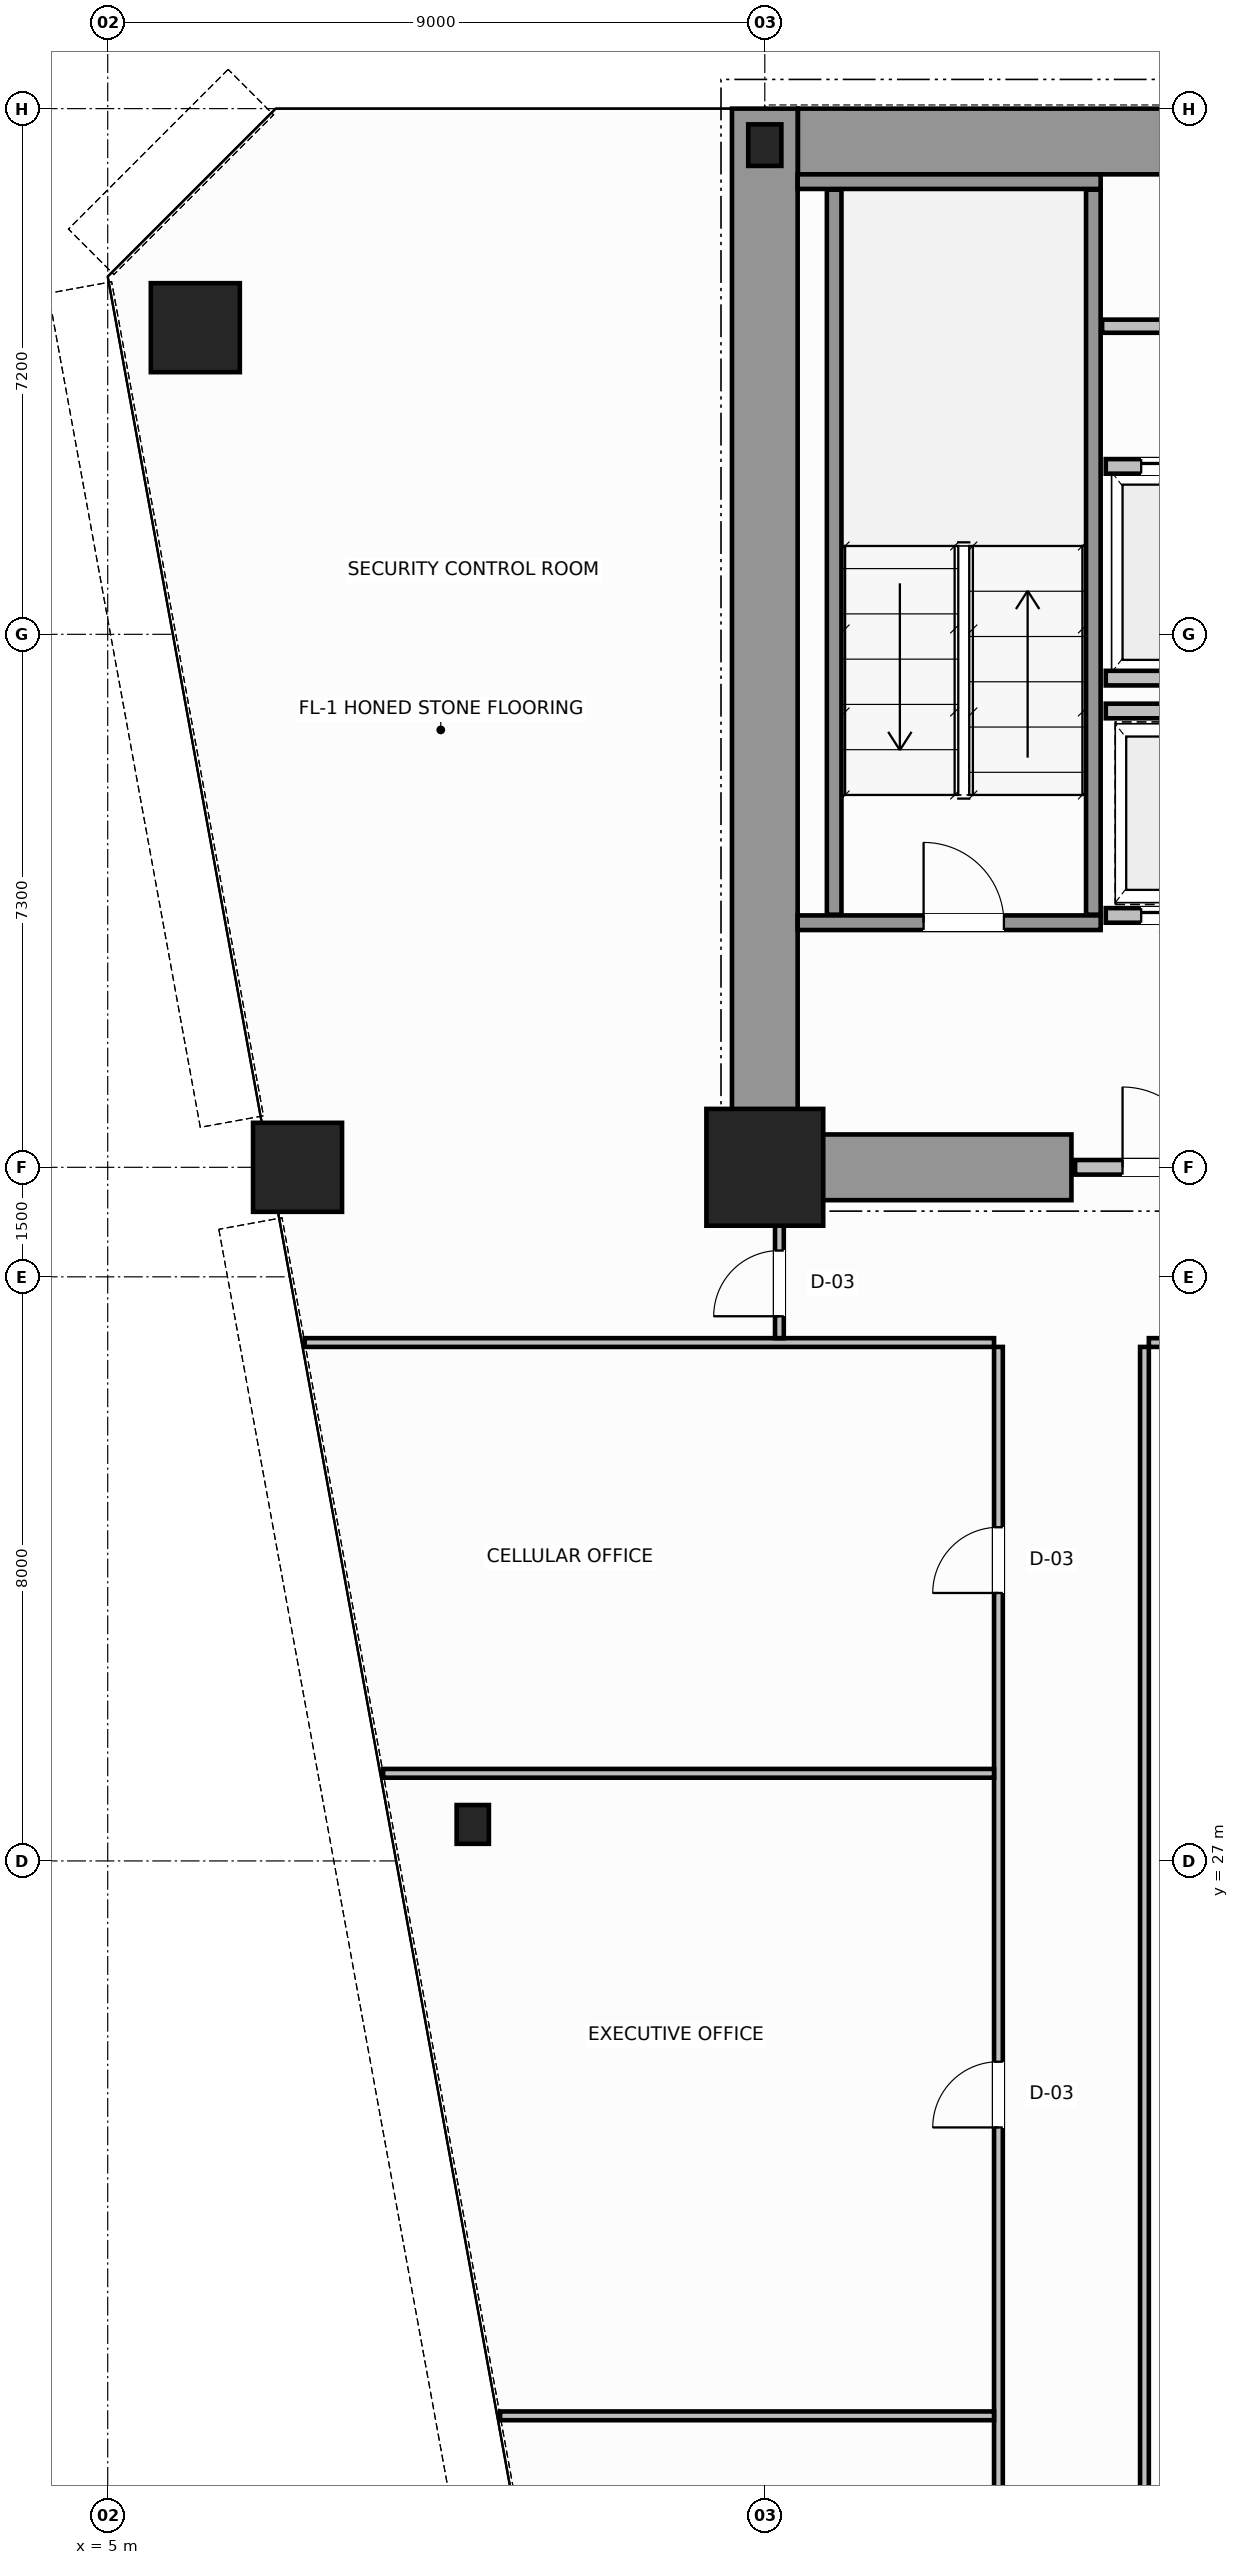
"""IFC4 building model, lengths in metres.
Left out: names, types, materials, properties, quantities, classifications, styles, units other than length and angle.
Written with IfcOpenShell. Run it as: python <this file> out.ifc"""

import sys

from ifc_helpers import new_model, si_unit, direction, frame, frame_2d, origin, origin_2d, place, context, subcontext, project, spatial, rectangle, hollow_circle, i_section, extrude, source, transform, mapped, element, fill, save


model = new_model("IFC4")
c1 = context("Model", 3, precision=1e-05, world=origin(), true_north=direction((0.0, 1.0)))
c2 = subcontext(c1, "Body", "Model", "MODEL_VIEW")
j1 = project(units=[si_unit("LENGTHUNIT", "METRE"), si_unit("PLANEANGLEUNIT", "RADIAN")], contexts=[c1])
p1 = place(None, origin())
s1 = spatial("IfcSite", under=j1, at=p1, CompositionType="ELEMENT")
p2 = place(p1, origin())
s2 = spatial("IfcBuilding", under=s1, at=p2, CompositionType="ELEMENT")
p3 = place(p2, frame((0.0, 0.0, 49.2)))
s3 = spatial("IfcBuildingStorey", under=s2, at=p3, CompositionType="ELEMENT", Elevation=49.2)
m1 = source(origin(), c2, "Body", "SweptSolid", [
    extrude(rectangle(XDim=1.6, YDim=1.6, at=origin_2d()), origin(), (0.0, 0.0, 1.0), 3.8),
])
p4 = place(p3, frame((14.0, 36.5, 0.0), z_axis=(0.0, 0.0, 1.0), x_axis=(1.0, 0.0, 0.0)))
e1 = element("IfcColumn", 1, at=p4, inside=s3, PredefinedType="COLUMN", context=c2, shape_type="MappedRepresentation", body=[
    mapped(m1, transform((0.0, 0.0, 0.0), scale=1.0)),
])
m2 = source(origin(), c2, "Body", "SweptSolid", [
    extrude(i_section(OverallWidth=0.454, OverallDepth=0.569, WebThickness=0.078, FlangeThickness=0.08, FilletRadius=0.015, at=origin_2d()), origin(), (0.0, 0.0, 1.0), 3.8),
])
p5 = place(p3, frame((14.0, 50.5, 0.0), z_axis=(0.0, 0.0, 1.0), x_axis=(1.0, 0.0, 0.0)))
e2 = element("IfcColumn", 2, at=p5, inside=s3, PredefinedType="COLUMN", context=c2, shape_type="MappedRepresentation", body=[
    mapped(m2, transform((0.0, 0.0, 0.0), scale=1.0)),
])
m3 = source(origin(), c2, "Body", "SweptSolid", [
    extrude(hollow_circle(Radius=0.61, WallThickness=0.05, at=origin_2d()), origin(), (0.0, 0.0, 1.0), 3.8),
])
for number, where, z_axis, x_axis in (
    (3, (6.2, 48.0, 0.0), (0.0, 0.0, 1.0), (1.0, 0.0, 0.0)),
    (4, (7.6, 36.5, 0.0), (0.0, 0.0, 1.0), (1.0, 0.0, 0.0)),
):
    element("IfcColumn", number, at=place(p3, frame(where, z_axis=z_axis, x_axis=x_axis)), inside=s3, PredefinedType="COLUMN", context=c2, shape_type="MappedRepresentation", body=[
        mapped(m3, transform((0.0, 0.0, 0.0), scale=1.0)),
    ])
m4 = source(origin(), c2, "Body", "SweptSolid", [
    extrude(i_section(OverallWidth=0.442, OverallDepth=0.531, WebThickness=0.065, FlangeThickness=0.076, FilletRadius=0.015, at=origin_2d()), origin(), (0.0, 0.0, 1.0), 3.8),
])
p6 = place(p3, frame((10.0, 27.5, 0.0), z_axis=(0.0, 0.0, 1.0), x_axis=(1.0, 0.0, 0.0)))
e5 = element("IfcColumn", 5, at=p6, inside=s3, PredefinedType="COLUMN", context=c2, shape_type="MappedRepresentation", body=[
    mapped(m4, transform((0.0, 0.0, 0.0), scale=1.0)),
])
p7 = place(p3, frame((14.454, 50.55, 0.0), z_axis=(0.0, 0.0, 1.0), x_axis=(1.0, 0.0, 0.0)))
e6 = element("IfcWall", 6, at=p7, inside=s3, PredefinedType="SHEAR", context=c2, shape_type="SweptSolid", body=[
    extrude(rectangle(XDim=19.544, YDim=0.9, at=frame_2d((9.772, 0.0))), origin(), (0.0, 0.0, 1.0), 3.8),
])
p8 = place(p3, frame((14.0, 36.5, 0.0), z_axis=(0.0, 0.0, 1.0), x_axis=(0.0, 1.0, 0.0)))
e7 = element("IfcWall", 7, at=p8, inside=s3, PredefinedType="SHEAR", context=c2, shape_type="SweptSolid", body=[
    extrude(rectangle(XDim=14.5, YDim=0.9, at=frame_2d((7.25, 0.0))), origin(), (0.0, 0.0, 1.0), 3.8),
])
p9 = place(p3, frame((14.47, 36.5, 0.0), z_axis=(0.0, 0.0, 1.0), x_axis=(1.0, 0.0, 0.0)))
e8 = element("IfcWall", 8, at=p9, inside=s3, PredefinedType="SHEAR", context=c2, shape_type="SweptSolid", body=[
    extrude(rectangle(XDim=3.73, YDim=0.9, at=frame_2d((1.865, 0.0))), origin(), (0.0, 0.0, 1.0), 2.38),
])
p10 = place(p3, frame((14.45, 39.85, 0.0), z_axis=(0.0, 0.0, 1.0), x_axis=(1.0, 0.0, 0.0)))
e9 = element("IfcWall", 9, at=p10, inside=s3, PredefinedType="SOLIDWALL", context=c2, shape_type="SweptSolid", body=[
    extrude(rectangle(XDim=4.15, YDim=0.2, at=frame_2d((2.075, 0.0))), origin(), (0.0, 0.0, 1.0), 3.8),
])
p11 = place(p10, frame((1.725, 0.0, 0.0)))
e10 = element("IfcOpeningElement", 10, at=p11, cuts=e9, PredefinedType="OPENING", context=c2, shape_type="SweptSolid", body=[
    extrude(rectangle(XDim=1.1, YDim=2.15, at=frame_2d((0.55, 1.075))), frame((0.0, 0.11, 0.0), z_axis=(0.0, -1.0, 0.0), x_axis=(1.0, 0.0, 0.0)), (0.0, 0.0, 1.0), 0.22),
])
p12 = place(p3, frame((14.45, 50.0, 0.0), z_axis=(0.0, 0.0, 1.0), x_axis=(1.0, 0.0, 0.0)))
e11 = element("IfcWall", 11, at=p12, inside=s3, PredefinedType="SOLIDWALL", context=c2, shape_type="SweptSolid", body=[
    extrude(rectangle(XDim=4.15, YDim=0.2, at=frame_2d((2.075, 0.0))), origin(), (0.0, 0.0, 1.0), 3.8),
])
for number, where, z_axis, x_axis in (
    (12, (14.95, 39.96, 0.0), (0.0, 0.0, 1.0), (0.0, 1.0, 0.0)),
    (13, (18.5, 39.96, 0.0), (0.0, 0.0, 1.0), (0.0, 1.0, 0.0)),
):
    element("IfcWall", number, at=place(p3, frame(where, z_axis=z_axis, x_axis=x_axis)), inside=s3, PredefinedType="SOLIDWALL", context=c2, shape_type="SweptSolid", body=[
        extrude(rectangle(XDim=9.93, YDim=0.2, at=frame_2d((4.965, 0.0))), origin(), (0.0, 0.0, 1.0), 3.8),
    ])
p13 = place(p3, frame((18.25, 36.5, 0.0), z_axis=(0.0, 0.0, 1.0), x_axis=(1.0, 0.0, 0.0)))
e14 = element("IfcWall", 14, at=p13, inside=s3, PredefinedType="SOLIDWALL", context=c2, shape_type="SweptSolid", body=[
    extrude(rectangle(XDim=2.47, YDim=0.2, at=frame_2d((1.235, 0.0))), origin(), (0.0, 0.0, 1.0), 2.37),
])
p14 = place(p13, frame((0.65, 0.0, 0.0)))
e15 = element("IfcOpeningElement", 15, at=p14, cuts=e14, PredefinedType="OPENING", context=c2, shape_type="SweptSolid", body=[
    extrude(rectangle(XDim=1.1, YDim=2.15, at=frame_2d((0.55, 1.075))), frame((0.0, 0.11, 0.0), z_axis=(0.0, -1.0, 0.0), x_axis=(1.0, 0.0, 0.0)), (0.0, 0.0, 1.0), 0.22),
])
p15 = place(p3, frame((18.67, 46.1, 0.0), z_axis=(0.0, 0.0, 1.0), x_axis=(1.0, 0.0, 0.0)))
e16 = element("IfcWall", 16, at=p15, inside=s3, PredefinedType="SOLIDWALL", context=c2, shape_type="SweptSolid", body=[
    extrude(rectangle(XDim=2.07, YDim=0.2, at=frame_2d((1.035, 0.0))), origin(), (0.0, 0.0, 1.0), 3.58),
])
p16 = place(p15, frame((0.485, 0.0, 0.0)))
e17 = element("IfcOpeningElement", 17, at=p16, cuts=e16, PredefinedType="OPENING", context=c2, shape_type="SweptSolid", body=[
    extrude(rectangle(XDim=1.1, YDim=2.15, at=frame_2d((0.55, 1.075))), frame((0.0, 0.11, 0.0), z_axis=(0.0, -1.0, 0.0), x_axis=(1.0, 0.0, 0.0)), (0.0, 0.0, 1.0), 0.22),
])
p17 = place(p3, frame((18.67, 43.2, 0.0), z_axis=(0.0, 0.0, 1.0), x_axis=(1.0, 0.0, 0.0)))
e18 = element("IfcWall", 18, at=p17, inside=s3, PredefinedType="SOLIDWALL", context=c2, shape_type="SweptSolid", body=[
    extrude(rectangle(XDim=2.07, YDim=0.2, at=frame_2d((1.035, 0.0))), origin(), (0.0, 0.0, 1.0), 3.58),
])
p18 = place(p3, frame((18.67, 39.95, 0.0), z_axis=(0.0, 0.0, 1.0), x_axis=(1.0, 0.0, 0.0)))
e19 = element("IfcWall", 19, at=p18, inside=s3, PredefinedType="SOLIDWALL", context=c2, shape_type="SweptSolid", body=[
    extrude(rectangle(XDim=2.07, YDim=0.2, at=frame_2d((1.035, 0.0))), origin(), (0.0, 0.0, 1.0), 3.58),
])
p19 = place(p18, frame((0.485, 0.0, 0.0)))
e20 = element("IfcOpeningElement", 20, at=p19, cuts=e19, PredefinedType="OPENING", context=c2, shape_type="SweptSolid", body=[
    extrude(rectangle(XDim=1.1, YDim=2.15, at=frame_2d((0.55, 1.075))), frame((0.0, 0.11, 0.0), z_axis=(0.0, -1.0, 0.0), x_axis=(1.0, 0.0, 0.0)), (0.0, 0.0, 1.0), 0.22),
])
p20 = place(p3, frame((18.67, 42.75, 0.0), z_axis=(0.0, 0.0, 1.0), x_axis=(1.0, 0.0, 0.0)))
e21 = element("IfcWall", 21, at=p20, inside=s3, PredefinedType="SOLIDWALL", context=c2, shape_type="SweptSolid", body=[
    extrude(rectangle(XDim=2.07, YDim=0.2, at=frame_2d((1.035, 0.0))), origin(), (0.0, 0.0, 1.0), 3.58),
])
p21 = place(p3, frame((18.62, 48.02, 0.0), z_axis=(0.0, 0.0, 1.0), x_axis=(1.0, 0.0, 0.0)))
e22 = element("IfcWall", 22, at=p21, inside=s3, PredefinedType="PLUMBINGWALL", context=c2, shape_type="SweptSolid", body=[
    extrude(rectangle(XDim=30.76, YDim=0.18, at=frame_2d((15.38, 0.0))), origin(), (0.0, 0.0, 1.0), 3.58),
])
p22 = place(p21, frame((1.655, 0.0, 0.0)))
e23 = element("IfcOpeningElement", 23, at=p22, cuts=e22, PredefinedType="OPENING", context=c2, shape_type="SweptSolid", body=[
    extrude(rectangle(XDim=0.9, YDim=2.15, at=frame_2d((0.45, 1.075))), frame((0.0, 0.1, 0.0), z_axis=(0.0, -1.0, 0.0), x_axis=(1.0, 0.0, 0.0)), (0.0, 0.0, 1.0), 0.2),
])
p23 = place(p21, frame((6.03, 0.0, 0.0)))
e24 = element("IfcOpeningElement", 24, at=p23, cuts=e22, PredefinedType="OPENING", context=c2, shape_type="SweptSolid", body=[
    extrude(rectangle(XDim=0.9, YDim=2.15, at=frame_2d((0.45, 1.075))), frame((0.0, 0.1, 0.0), z_axis=(0.0, -1.0, 0.0), x_axis=(1.0, 0.0, 0.0)), (0.0, 0.0, 1.0), 0.2),
])
p24 = place(p21, frame((10.93, 0.0, 0.0)))
e25 = element("IfcOpeningElement", 25, at=p24, cuts=e22, PredefinedType="OPENING", context=c2, shape_type="SweptSolid", body=[
    extrude(rectangle(XDim=0.9, YDim=2.15, at=frame_2d((0.45, 1.075))), frame((0.0, 0.1, 0.0), z_axis=(0.0, -1.0, 0.0), x_axis=(1.0, 0.0, 0.0)), (0.0, 0.0, 1.0), 0.2),
])
p25 = place(p21, frame((16.13, 0.0, 0.0)))
e26 = element("IfcOpeningElement", 26, at=p25, cuts=e22, PredefinedType="OPENING", context=c2, shape_type="SweptSolid", body=[
    extrude(rectangle(XDim=0.9, YDim=2.15, at=frame_2d((0.45, 1.075))), frame((0.0, 0.1, 0.0), z_axis=(0.0, -1.0, 0.0), x_axis=(1.0, 0.0, 0.0)), (0.0, 0.0, 1.0), 0.2),
])
p26 = place(p21, frame((21.73, 0.0, 0.0)))
e27 = element("IfcOpeningElement", 27, at=p26, cuts=e22, PredefinedType="OPENING", context=c2, shape_type="SweptSolid", body=[
    extrude(rectangle(XDim=0.9, YDim=2.15, at=frame_2d((0.45, 1.075))), frame((0.0, 0.1, 0.0), z_axis=(0.0, -1.0, 0.0), x_axis=(1.0, 0.0, 0.0)), (0.0, 0.0, 1.0), 0.2),
])
p27 = place(p21, frame((27.505, 0.0, 0.0)))
e28 = element("IfcOpeningElement", 28, at=p27, cuts=e22, PredefinedType="OPENING", context=c2, shape_type="SweptSolid", body=[
    extrude(rectangle(XDim=0.9, YDim=2.15, at=frame_2d((0.45, 1.075))), frame((0.0, 0.1, 0.0), z_axis=(0.0, -1.0, 0.0), x_axis=(1.0, 0.0, 0.0)), (0.0, 0.0, 1.0), 0.2),
])
p28 = place(p3, frame((19.26, 34.1, 0.0), z_axis=(0.0, 0.0, 1.0), x_axis=(1.0, 0.0, 0.0)))
e29 = element("IfcWall", 29, at=p28, inside=s3, PredefinedType="PARTITIONING", context=c2, shape_type="SweptSolid", body=[
    extrude(rectangle(XDim=29.48, YDim=0.12, at=frame_2d((14.74, 0.0))), origin(), (0.0, 0.0, 1.0), 3.58),
])
p29 = place(p28, frame((1.49, 0.0, 0.0)))
e30 = element("IfcOpeningElement", 30, at=p29, cuts=e29, PredefinedType="OPENING", context=c2, shape_type="SweptSolid", body=[
    extrude(rectangle(XDim=0.9, YDim=2.15, at=frame_2d((0.45, 1.075))), frame((0.0, 0.07, 0.0), z_axis=(0.0, -1.0, 0.0), x_axis=(1.0, 0.0, 0.0)), (0.0, 0.0, 1.0), 0.14),
])
p30 = place(p28, frame((9.79, 0.0, 0.0)))
e31 = element("IfcOpeningElement", 31, at=p30, cuts=e29, PredefinedType="OPENING", context=c2, shape_type="SweptSolid", body=[
    extrude(rectangle(XDim=0.9, YDim=2.15, at=frame_2d((0.45, 1.075))), frame((0.0, 0.07, 0.0), z_axis=(0.0, -1.0, 0.0), x_axis=(1.0, 0.0, 0.0)), (0.0, 0.0, 1.0), 0.14),
])
p31 = place(p28, frame((22.59, 0.0, 0.0)))
e32 = element("IfcOpeningElement", 32, at=p31, cuts=e29, PredefinedType="OPENING", context=c2, shape_type="SweptSolid", body=[
    extrude(rectangle(XDim=0.9, YDim=2.15, at=frame_2d((0.45, 1.075))), frame((0.0, 0.07, 0.0), z_axis=(0.0, -1.0, 0.0), x_axis=(1.0, 0.0, 0.0)), (0.0, 0.0, 1.0), 0.14),
])
p32 = place(p3, frame((7.698, 34.1, 0.0), z_axis=(0.0, 0.0, 1.0), x_axis=(1.0, 0.0, 0.0)))
e33 = element("IfcWall", 33, at=p32, inside=s3, PredefinedType="PARTITIONING", context=c2, shape_type="SweptSolid", body=[
    extrude(rectangle(XDim=9.442, YDim=0.12, at=frame_2d((4.721, 0.0))), origin(), (0.0, 0.0, 1.0), 3.58),
])
p33 = place(p3, frame((14.2, 34.16, 0.0), z_axis=(0.0, 0.0, 1.0), x_axis=(0.0, 1.0, 0.0)))
e34 = element("IfcWall", 34, at=p33, inside=s3, PredefinedType="PARTITIONING", context=c2, shape_type="SweptSolid", body=[
    extrude(rectangle(XDim=2.28, YDim=0.12, at=frame_2d((1.14, 0.0))), origin(), (0.0, 0.0, 1.0), 3.58),
])
p34 = place(p33, frame((0.3, 0.0, 0.0)))
e35 = element("IfcOpeningElement", 35, at=p34, cuts=e34, PredefinedType="OPENING", context=c2, shape_type="SweptSolid", body=[
    extrude(rectangle(XDim=0.9, YDim=2.15, at=frame_2d((0.45, 1.075))), frame((0.0, 0.07, 0.0), z_axis=(0.0, -1.0, 0.0), x_axis=(1.0, 0.0, 0.0)), (0.0, 0.0, 1.0), 0.14),
])
p35 = place(p3, frame((17.2, 12.8, 0.0), z_axis=(0.0, 0.0, 1.0), x_axis=(0.0, 1.0, 0.0)))
e36 = element("IfcWall", 36, at=p35, inside=s3, PredefinedType="PARTITIONING", context=c2, shape_type="SweptSolid", body=[
    extrude(rectangle(XDim=21.24, YDim=0.12, at=frame_2d((10.62, 0.0))), origin(), (0.0, 0.0, 1.0), 3.58),
])
p36 = place(p35, frame((2.85, 0.0, 0.0)))
e37 = element("IfcOpeningElement", 37, at=p36, cuts=e36, PredefinedType="OPENING", context=c2, shape_type="SweptSolid", body=[
    extrude(rectangle(XDim=0.9, YDim=2.15, at=frame_2d((0.45, 1.075))), frame((0.0, 0.07, 0.0), z_axis=(0.0, -1.0, 0.0), x_axis=(1.0, 0.0, 0.0)), (0.0, 0.0, 1.0), 0.14),
])
p37 = place(p35, frame((10.55, 0.0, 0.0)))
e38 = element("IfcOpeningElement", 38, at=p37, cuts=e36, PredefinedType="OPENING", context=c2, shape_type="SweptSolid", body=[
    extrude(rectangle(XDim=0.9, YDim=2.15, at=frame_2d((0.45, 1.075))), frame((0.0, 0.07, 0.0), z_axis=(0.0, -1.0, 0.0), x_axis=(1.0, 0.0, 0.0)), (0.0, 0.0, 1.0), 0.14),
])
p38 = place(p35, frame((17.87, 0.0, 0.0)))
e39 = element("IfcOpeningElement", 39, at=p38, cuts=e36, PredefinedType="OPENING", context=c2, shape_type="SweptSolid", body=[
    extrude(rectangle(XDim=0.9, YDim=2.15, at=frame_2d((0.45, 1.075))), frame((0.0, 0.07, 0.0), z_axis=(0.0, -1.0, 0.0), x_axis=(1.0, 0.0, 0.0)), (0.0, 0.0, 1.0), 0.14),
])
p39 = place(p3, frame((19.2, 12.8, 0.0), z_axis=(0.0, 0.0, 1.0), x_axis=(0.0, 1.0, 0.0)))
e40 = element("IfcWall", 40, at=p39, inside=s3, PredefinedType="PARTITIONING", context=c2, shape_type="SweptSolid", body=[
    extrude(rectangle(XDim=21.24, YDim=0.12, at=frame_2d((10.62, 0.0))), origin(), (0.0, 0.0, 1.0), 3.58),
])
p40 = place(p3, frame((10.375, 19.4, 0.0), z_axis=(0.0, 0.0, 1.0), x_axis=(1.0, 0.0, 0.0)))
e41 = element("IfcWall", 41, at=p40, inside=s3, PredefinedType="PARTITIONING", context=c2, shape_type="SweptSolid", body=[
    extrude(rectangle(XDim=6.765, YDim=0.12, at=frame_2d((3.383, 0.0))), origin(), (0.0, 0.0, 1.0), 3.58),
])
p41 = place(p3, frame((8.772, 28.2, 0.0), z_axis=(0.0, 0.0, 1.0), x_axis=(1.0, 0.0, 0.0)))
e42 = element("IfcWall", 42, at=p41, inside=s3, PredefinedType="PARTITIONING", context=c2, shape_type="SweptSolid", body=[
    extrude(rectangle(XDim=8.368, YDim=0.12, at=frame_2d((4.184, 0.0))), origin(), (0.0, 0.0, 1.0), 3.58),
])
m5 = source(origin(), c2, "Body", "SweptSolid", [
    extrude(rectangle(XDim=1.1, YDim=2.15, at=frame_2d((0.55, 1.075))), frame((0.0, 0.025, 0.0), z_axis=(0.0, -1.0, 0.0), x_axis=(1.0, 0.0, 0.0)), (0.0, 0.0, 1.0), 0.05),
])
p42 = place(p11, origin())
e43 = element("IfcDoor", 43, at=p42, inside=s3, OperationType="SINGLE_SWING_LEFT", PredefinedType="DOOR", context=c2, shape_type="MappedRepresentation", body=[
    mapped(m5, transform((0.0, 0.0, 0.0), scale=1.0)),
])
fill(e10, e43)
p43 = place(p14, origin())
e44 = element("IfcDoor", 44, at=p43, inside=s3, OperationType="SINGLE_SWING_RIGHT", PredefinedType="DOOR", context=c2, shape_type="MappedRepresentation", body=[
    mapped(m5, transform((0.0, 0.0, 0.0), scale=1.0)),
])
fill(e15, e44)
p44 = place(p16, origin())
e45 = element("IfcDoor", 45, at=p44, inside=s3, OperationType="DOUBLE_DOOR_SLIDING", PredefinedType="DOOR", context=c2, shape_type="MappedRepresentation", body=[
    mapped(m5, transform((0.0, 0.0, 0.0), scale=1.0)),
])
fill(e17, e45)
p45 = place(p19, origin())
e46 = element("IfcDoor", 46, at=p45, inside=s3, OperationType="DOUBLE_DOOR_SLIDING", PredefinedType="DOOR", context=c2, shape_type="MappedRepresentation", body=[
    mapped(m5, transform((0.0, 0.0, 0.0), scale=1.0)),
])
fill(e20, e46)
m6 = source(origin(), c2, "Body", "SweptSolid", [
    extrude(rectangle(XDim=0.9, YDim=2.15, at=frame_2d((0.45, 1.075))), frame((0.0, 0.025, 0.0), z_axis=(0.0, -1.0, 0.0), x_axis=(1.0, 0.0, 0.0)), (0.0, 0.0, 1.0), 0.05),
])
p46 = place(p34, origin())
e47 = element("IfcDoor", 47, at=p46, inside=s3, OperationType="SINGLE_SWING_LEFT", PredefinedType="DOOR", context=c2, shape_type="MappedRepresentation", body=[
    mapped(m6, transform((0.0, 0.0, 0.0), scale=1.0)),
])
fill(e35, e47)
p47 = place(p37, origin())
e48 = element("IfcDoor", 48, at=p47, inside=s3, OperationType="SINGLE_SWING_RIGHT", PredefinedType="DOOR", context=c2, shape_type="MappedRepresentation", body=[
    mapped(m6, transform((0.0, 0.0, 0.0), scale=1.0)),
])
fill(e38, e48)
p48 = place(p38, origin())
e49 = element("IfcDoor", 49, at=p48, inside=s3, OperationType="SINGLE_SWING_LEFT", PredefinedType="DOOR", context=c2, shape_type="MappedRepresentation", body=[
    mapped(m6, transform((0.0, 0.0, 0.0), scale=1.0)),
])
fill(e39, e49)
save(model, sys.argv[1])
